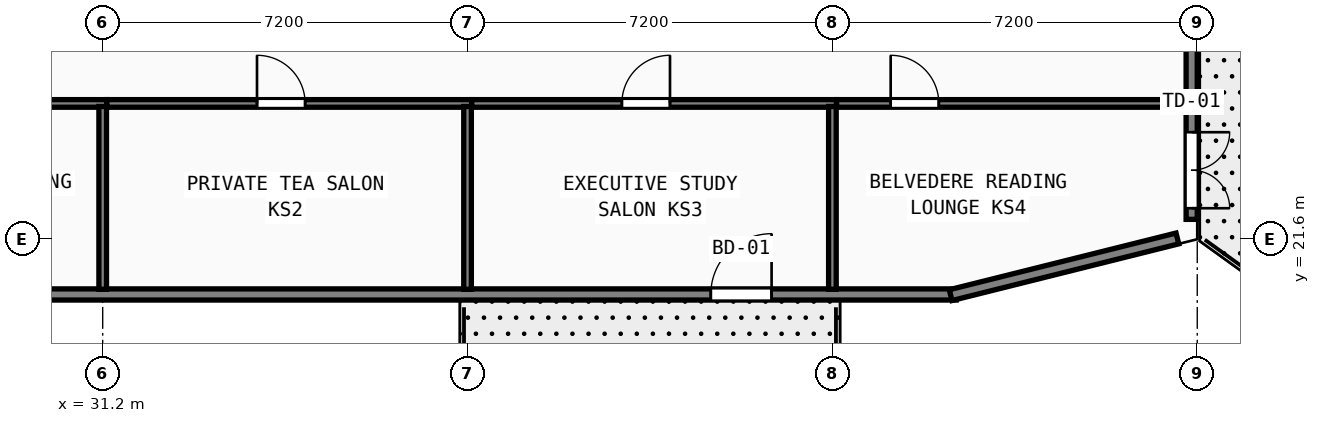
"""IFC4 building model, lengths in metres.
Left out: names, types, materials, properties, quantities, classifications, styles, units other than length and angle.
Written with IfcOpenShell. Run it as: python <this file> out.ifc"""

import sys

from ifc_helpers import new_model, si_unit, direction, frame, frame_2d, origin, origin_2d, place, context, subcontext, project, spatial, rectangle, hollow_rectangle, extrude, element, fill, save


model = new_model("IFC4")
c1 = context("Model", 3, precision=1e-05, world=origin(), true_north=direction((0.0, 1.0)))
c2 = subcontext(c1, "Body", "Model", "MODEL_VIEW")
j1 = project(units=[si_unit("LENGTHUNIT", "METRE"), si_unit("PLANEANGLEUNIT", "RADIAN")], contexts=[c1])
p1 = place(None, origin())
s1 = spatial("IfcSite", under=j1, at=p1, CompositionType="ELEMENT")
p2 = place(p1, origin())
s2 = spatial("IfcBuilding", under=s1, at=p2, CompositionType="ELEMENT")
p3 = place(p2, frame((0.0, 0.0, 235.2)))
s3 = spatial("IfcBuildingStorey", under=s2, at=p3, CompositionType="ELEMENT", Elevation=235.2)
for number, where, z_axis, x_axis in (
    (1, (52.8, 21.6, 0.0), (0.0, 0.0, 1.0), (1.0, 0.0, 0.0)),
    (2, (31.2, 21.6, 0.0), (0.0, 0.0, 1.0), (1.0, 0.0, 0.0)),
    (3, (45.6, 21.6, 0.0), (0.0, 0.0, 1.0), (1.0, 0.0, 0.0)),
):
    element("IfcColumn", number, at=place(p3, frame(where, z_axis=z_axis, x_axis=x_axis)), inside=s3, PredefinedType="COLUMN", context=c2, shape_type="SweptSolid", body=[
        extrude(hollow_rectangle(XDim=0.8, YDim=0.8, WallThickness=0.03, at=origin_2d()), origin(), (0.0, 0.0, 1.0), 3.85),
    ])
p4 = place(p3, frame((38.4, 21.6, 0.0), z_axis=(0.0, 0.0, 1.0), x_axis=(1.0, 0.0, 0.0)))
e4 = element("IfcColumn", 4, at=p4, inside=s3, PredefinedType="COLUMN", context=c2, shape_type="SweptSolid", body=[
    extrude(hollow_rectangle(XDim=0.7, YDim=0.7, WallThickness=0.026, at=origin_2d()), origin(), (0.0, 0.0, 1.0), 3.85),
])
p5 = place(p3, frame((28.759, 20.51, 0.0), z_axis=(0.0, 0.0, 1.0), x_axis=(1.0, 0.0, 0.0)))
e5 = element("IfcWall", 5, at=p5, inside=s3, PredefinedType="SOLIDWALL", context=c2, shape_type="SweptSolid", body=[
    extrude(rectangle(XDim=19.283, YDim=0.22, at=frame_2d((9.642, 0.0))), origin(), (0.0, 0.0, 1.0), 3.67),
])
p6 = place(p5, frame((15.641, 0.0, 0.0), z_axis=(0.0, 0.0, 1.0), x_axis=(-1.0, 0.0, 0.0)))
e6 = element("IfcOpeningElement", 6, at=p6, cuts=e5, PredefinedType="OPENING", context=c2, shape_type="SweptSolid", body=[
    extrude(rectangle(XDim=1.2, YDim=2.15, at=frame_2d((0.6, 1.075))), frame((0.0, 0.12, 0.0), z_axis=(0.0, -1.0, 0.0), x_axis=(1.0, 0.0, 0.0)), (0.0, 0.0, 1.0), 0.24),
])
p7 = place(p3, frame((47.933, 20.497, 0.0), z_axis=(0.0, 0.0, 1.0), x_axis=(0.970133159038, 0.242572986408, 0.0)))
e7 = element("IfcWall", 7, at=p7, inside=s3, PredefinedType="SOLIDWALL", context=c2, shape_type="SweptSolid", body=[
    extrude(rectangle(XDim=4.613, YDim=0.22, at=frame_2d((2.306, 0.0))), origin(), (0.0, 0.0, 1.0), 3.315),
])
p8 = place(p3, frame((52.69, 21.992, 0.0), z_axis=(0.0, 0.0, 1.0), x_axis=(0.0, 1.0, 0.0)))
e8 = element("IfcWall", 8, at=p8, inside=s3, PredefinedType="SOLIDWALL", context=c2, shape_type="SweptSolid", body=[
    extrude(rectangle(XDim=5.266, YDim=0.22, at=frame_2d((2.633, 0.0))), origin(), (0.0, 0.0, 1.0), 3.315),
])
p9 = place(p8, frame((1.72, 0.0, 0.0), z_axis=(0.0, 0.0, 1.0), x_axis=(-1.0, 0.0, 0.0)))
e9 = element("IfcOpeningElement", 9, at=p9, cuts=e8, PredefinedType="OPENING", context=c2, shape_type="SweptSolid", body=[
    extrude(rectangle(XDim=1.5, YDim=2.2, at=frame_2d((0.75, 1.1))), frame((0.0, 0.12, 0.0), z_axis=(0.0, -1.0, 0.0), x_axis=(1.0, 0.0, 0.0)), (0.0, 0.0, 1.0), 0.24),
])
p10 = place(p3, frame((23.92, 24.28, 0.0), z_axis=(0.0, 0.0, 1.0), x_axis=(1.0, 0.0, 0.0)))
e10 = element("IfcWall", 10, at=p10, inside=s3, PredefinedType="PARTITIONING", context=c2, shape_type="SweptSolid", body=[
    extrude(rectangle(XDim=7.36, YDim=0.15, at=frame_2d((3.68, 0.0))), origin(), (0.0, 0.0, 1.0), 3.67),
])
p11 = place(p10, frame((5.97, 0.0, 0.0), z_axis=(0.0, 0.0, 1.0), x_axis=(-1.0, 0.0, 0.0)))
e11 = element("IfcOpeningElement", 11, at=p11, cuts=e10, PredefinedType="OPENING", context=c2, shape_type="SweptSolid", body=[
    extrude(rectangle(XDim=0.95, YDim=2.12, at=frame_2d((0.475, 1.06))), frame((0.0, 0.085, 0.0), z_axis=(0.0, -1.0, 0.0), x_axis=(1.0, 0.0, 0.0)), (0.0, 0.0, 1.0), 0.17),
])
p12 = place(p3, frame((31.2, 20.612, 0.0), z_axis=(0.0, 0.0, 1.0), x_axis=(0.0, 1.0, 0.0)))
e12 = element("IfcWall", 12, at=p12, inside=s3, PredefinedType="PARTITIONING", context=c2, shape_type="SweptSolid", body=[
    extrude(rectangle(XDim=3.608, YDim=0.15, at=frame_2d((1.804, 0.0))), origin(), (0.0, 0.0, 1.0), 3.155),
])
p13 = place(p3, frame((31.282, 24.28, 0.0), z_axis=(0.0, 0.0, 1.0), x_axis=(1.0, 0.0, 0.0)))
e13 = element("IfcWall", 13, at=p13, inside=s3, PredefinedType="PARTITIONING", context=c2, shape_type="SweptSolid", body=[
    extrude(rectangle(XDim=7.198, YDim=0.15, at=frame_2d((3.599, 0.0))), origin(), (0.0, 0.0, 1.0), 3.67),
])
p14 = place(p13, frame((3.913, 0.0, 0.0), z_axis=(0.0, 0.0, 1.0), x_axis=(-1.0, 0.0, 0.0)))
e14 = element("IfcOpeningElement", 14, at=p14, cuts=e13, PredefinedType="OPENING", context=c2, shape_type="SweptSolid", body=[
    extrude(rectangle(XDim=0.95, YDim=2.12, at=frame_2d((0.475, 1.06))), frame((0.0, 0.085, 0.0), z_axis=(0.0, -1.0, 0.0), x_axis=(1.0, 0.0, 0.0)), (0.0, 0.0, 1.0), 0.17),
])
p15 = place(p3, frame((38.4, 20.612, 0.0), z_axis=(0.0, 0.0, 1.0), x_axis=(0.0, 1.0, 0.0)))
e15 = element("IfcWall", 15, at=p15, inside=s3, PredefinedType="PARTITIONING", context=c2, shape_type="SweptSolid", body=[
    extrude(rectangle(XDim=3.608, YDim=0.15, at=frame_2d((1.804, 0.0))), origin(), (0.0, 0.0, 1.0), 3.155),
])
p16 = place(p3, frame((38.482, 24.28, 0.0), z_axis=(0.0, 0.0, 1.0), x_axis=(1.0, 0.0, 0.0)))
e16 = element("IfcWall", 16, at=p16, inside=s3, PredefinedType="PARTITIONING", context=c2, shape_type="SweptSolid", body=[
    extrude(rectangle(XDim=7.198, YDim=0.15, at=frame_2d((3.599, 0.0))), origin(), (0.0, 0.0, 1.0), 3.67),
])
p17 = place(p16, frame((3.913, 0.0, 0.0), z_axis=(0.0, 0.0, 1.0), x_axis=(-1.0, 0.0, 0.0)))
e17 = element("IfcOpeningElement", 17, at=p17, cuts=e16, PredefinedType="OPENING", context=c2, shape_type="SweptSolid", body=[
    extrude(rectangle(XDim=0.95, YDim=2.12, at=frame_2d((0.475, 1.06))), frame((0.0, 0.085, 0.0), z_axis=(0.0, -1.0, 0.0), x_axis=(1.0, 0.0, 0.0)), (0.0, 0.0, 1.0), 0.17),
])
p18 = place(p3, frame((45.6, 20.612, 0.0), z_axis=(0.0, 0.0, 1.0), x_axis=(0.0, 1.0, 0.0)))
e18 = element("IfcWall", 18, at=p18, inside=s3, PredefinedType="PARTITIONING", context=c2, shape_type="SweptSolid", body=[
    extrude(rectangle(XDim=3.608, YDim=0.15, at=frame_2d((1.804, 0.0))), origin(), (0.0, 0.0, 1.0), 3.155),
])
p19 = place(p3, frame((45.682, 24.28, 0.0), z_axis=(0.0, 0.0, 1.0), x_axis=(1.0, 0.0, 0.0)))
e19 = element("IfcWall", 19, at=p19, inside=s3, PredefinedType="PARTITIONING", context=c2, shape_type="SweptSolid", body=[
    extrude(rectangle(XDim=6.906, YDim=0.15, at=frame_2d((3.453, 0.0))), origin(), (0.0, 0.0, 1.0), 3.67),
])
p20 = place(p19, frame((2.018, 0.0, 0.0), z_axis=(0.0, 0.0, 1.0), x_axis=(-1.0, 0.0, 0.0)))
e20 = element("IfcOpeningElement", 20, at=p20, cuts=e19, PredefinedType="OPENING", context=c2, shape_type="SweptSolid", body=[
    extrude(rectangle(XDim=0.95, YDim=2.12, at=frame_2d((0.475, 1.06))), frame((0.0, 0.085, 0.0), z_axis=(0.0, -1.0, 0.0), x_axis=(1.0, 0.0, 0.0)), (0.0, 0.0, 1.0), 0.17),
])
p21 = place(p9, origin())
e21 = element("IfcDoor", 21, at=p21, inside=s3, OperationType="DOUBLE_DOOR_SINGLE_SWING", PredefinedType="DOOR", context=c2, shape_type="SweptSolid", body=[
    extrude(rectangle(XDim=1.5, YDim=2.2, at=frame_2d((0.75, 1.1))), frame((0.0, 0.025, 0.0), z_axis=(0.0, -1.0, 0.0), x_axis=(1.0, 0.0, 0.0)), (0.0, 0.0, 1.0), 0.05),
])
fill(e9, e21)
p22 = place(p6, origin())
e22 = element("IfcDoor", 22, at=p22, inside=s3, OperationType="SINGLE_SWING_LEFT", PredefinedType="DOOR", context=c2, shape_type="SweptSolid", body=[
    extrude(rectangle(XDim=1.2, YDim=2.15, at=frame_2d((0.6, 1.075))), frame((0.0, 0.025, 0.0), z_axis=(0.0, -1.0, 0.0), x_axis=(1.0, 0.0, 0.0)), (0.0, 0.0, 1.0), 0.05),
])
fill(e6, e22)
p23 = place(p14, origin())
e23 = element("IfcDoor", 23, at=p23, inside=s3, OperationType="SINGLE_SWING_RIGHT", PredefinedType="DOOR", context=c2, shape_type="SweptSolid", body=[
    extrude(rectangle(XDim=0.95, YDim=2.12, at=frame_2d((0.475, 1.06))), frame((0.0, 0.025, 0.0), z_axis=(0.0, -1.0, 0.0), x_axis=(1.0, 0.0, 0.0)), (0.0, 0.0, 1.0), 0.05),
])
fill(e14, e23)
p24 = place(p17, origin())
e24 = element("IfcDoor", 24, at=p24, inside=s3, OperationType="SINGLE_SWING_LEFT", PredefinedType="DOOR", context=c2, shape_type="SweptSolid", body=[
    extrude(rectangle(XDim=0.95, YDim=2.12, at=frame_2d((0.475, 1.06))), frame((0.0, 0.025, 0.0), z_axis=(0.0, -1.0, 0.0), x_axis=(1.0, 0.0, 0.0)), (0.0, 0.0, 1.0), 0.05),
])
fill(e17, e24)
p25 = place(p20, origin())
e25 = element("IfcDoor", 25, at=p25, inside=s3, OperationType="SINGLE_SWING_RIGHT", PredefinedType="DOOR", context=c2, shape_type="SweptSolid", body=[
    extrude(rectangle(XDim=0.95, YDim=2.12, at=frame_2d((0.475, 1.06))), frame((0.0, 0.025, 0.0), z_axis=(0.0, -1.0, 0.0), x_axis=(1.0, 0.0, 0.0)), (0.0, 0.0, 1.0), 0.05),
])
fill(e20, e25)
save(model, sys.argv[1])
